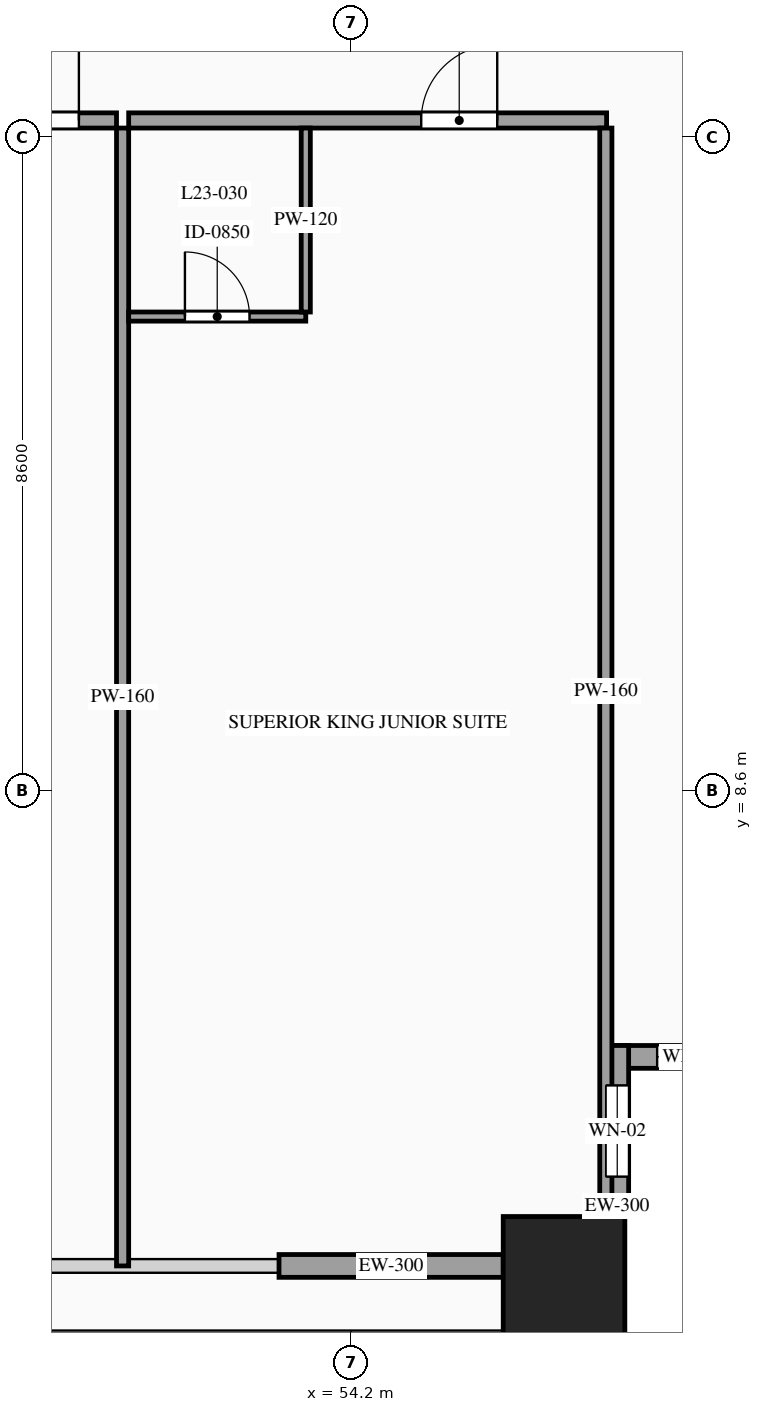
"""IFC4 building model, lengths in metres.
Left out: names, types, materials, properties, quantities, classifications, styles, units other than length and angle.
Written with IfcOpenShell. Run it as: python <this file> out.ifc"""

import sys

from ifc_helpers import new_model, si_unit, direction, frame, frame_2d, origin, origin_2d, place, context, subcontext, project, spatial, rectangle, hollow_rectangle, extrude, source, transform, mapped, element, fill, save


model = new_model("IFC4")
c1 = context("Model", 3, precision=1e-05, world=origin(), true_north=direction((0.0, 1.0)))
c2 = subcontext(c1, "Body", "Model", "MODEL_VIEW")
j1 = project(units=[si_unit("LENGTHUNIT", "METRE"), si_unit("PLANEANGLEUNIT", "RADIAN")], contexts=[c1])
p1 = place(None, origin())
s1 = spatial("IfcSite", under=j1, at=p1, CompositionType="ELEMENT")
p2 = place(p1, origin())
s2 = spatial("IfcBuilding", under=s1, at=p2, CompositionType="ELEMENT")
p3 = place(p2, frame((0.0, 0.0, 90.2)))
s3 = spatial("IfcBuildingStorey", under=s2, at=p3, CompositionType="ELEMENT", Elevation=90.2)
m1 = source(origin(), c2, "Body", "SweptSolid", [
    extrude(hollow_rectangle(XDim=1.6, YDim=1.6, WallThickness=0.07, at=origin_2d()), origin(), (0.0, 0.0, 1.0), 3.6),
])
p4 = place(p3, frame((57.0, 2.2, 0.0), z_axis=(0.0, 0.0, 1.0), x_axis=(1.0, 0.0, 0.0)))
e1 = element("IfcColumn", 1, at=p4, inside=s3, PredefinedType="COLUMN", context=c2, shape_type="MappedRepresentation", body=[
    mapped(m1, transform((0.0, 0.0, 0.0), scale=1.0)),
])
p5 = place(p3, frame((57.55, 5.1, 0.0), z_axis=(0.0, 0.0, 1.0), x_axis=(1.0, 0.0, 0.0)))
e2 = element("IfcWall", 2, at=p5, inside=s3, PredefinedType="SOLIDWALL", context=c2, shape_type="SweptSolid", body=[
    extrude(rectangle(XDim=2.25, YDim=0.3, at=frame_2d((1.125, 0.0))), origin(), (0.0, 0.0, 1.0), 3.38),
])
p6 = place(p5, frame((0.675, 0.0, 0.85)))
e3 = element("IfcOpeningElement", 3, at=p6, cuts=e2, PredefinedType="OPENING", context=c2, shape_type="SweptSolid", body=[
    extrude(rectangle(XDim=0.9, YDim=1.5, at=frame_2d((0.45, 0.75))), frame((0.0, 0.165, 0.0), z_axis=(0.0, -1.0, 0.0), x_axis=(1.0, 0.0, 0.0)), (0.0, 0.0, 1.0), 0.33),
])
p7 = place(p3, frame((57.7, 3.0, 0.0), z_axis=(0.0, 0.0, 1.0), x_axis=(0.0, 1.0, 0.0)))
e4 = element("IfcWall", 4, at=p7, inside=s3, PredefinedType="SOLIDWALL", context=c2, shape_type="SweptSolid", body=[
    extrude(rectangle(XDim=2.25, YDim=0.3, at=frame_2d((1.125, 0.0))), origin(), (0.0, 0.0, 1.0), 3.38),
])
p8 = place(p7, frame((0.525, 0.0, 0.85)))
e5 = element("IfcOpeningElement", 5, at=p8, cuts=e4, PredefinedType="OPENING", context=c2, shape_type="SweptSolid", body=[
    extrude(rectangle(XDim=1.2, YDim=2.1, at=frame_2d((0.6, 1.05))), frame((0.0, 0.165, 0.0), z_axis=(0.0, -1.0, 0.0), x_axis=(1.0, 0.0, 0.0)), (0.0, 0.0, 1.0), 0.33),
])
m2 = source(origin(), c2, "Body", "SweptSolid", [
    extrude(rectangle(XDim=2.95, YDim=0.3, at=frame_2d((1.475, 0.0))), origin(), (0.0, 0.0, 1.0), 2.775),
])
p9 = place(p3, frame((53.25, 2.35, 0.0), z_axis=(0.0, 0.0, 1.0), x_axis=(1.0, 0.0, 0.0)))
e6 = element("IfcWall", 6, at=p9, inside=s3, PredefinedType="SOLIDWALL", context=c2, shape_type="MappedRepresentation", body=[
    mapped(m2, transform((0.0, 0.0, 0.0), scale=1.0)),
])
p10 = place(p3, frame((46.714, 17.42, 0.0), z_axis=(0.0, 0.0, 1.0), x_axis=(1.0, 0.0, 0.0)))
e7 = element("IfcWall", 7, at=p10, inside=s3, PredefinedType="PARTITIONING", context=c2, shape_type="SweptSolid", body=[
    extrude(rectangle(XDim=4.398, YDim=0.2, at=frame_2d((2.199, 0.0))), origin(), (0.0, 0.0, 1.0), 3.38),
])
p11 = place(p10, frame((2.903, 0.0, 0.0)))
e8 = element("IfcOpeningElement", 8, at=p11, cuts=e7, PredefinedType="OPENING", context=c2, shape_type="SweptSolid", body=[
    extrude(rectangle(XDim=1.0, YDim=2.2, at=frame_2d((0.5, 1.1))), frame((0.0, 0.115, 0.0), z_axis=(0.0, -1.0, 0.0), x_axis=(1.0, 0.0, 0.0)), (0.0, 0.0, 1.0), 0.23),
])
m3 = source(origin(), c2, "Body", "SweptSolid", [
    extrude(rectangle(XDim=14.97, YDim=0.16, at=frame_2d((7.485, 0.0))), origin(), (0.0, 0.0, 1.0), 3.38),
])
p12 = place(p3, frame((51.192, 2.35, 0.0), z_axis=(0.0, 0.0, 1.0), x_axis=(0.0, 1.0, 0.0)))
e9 = element("IfcWall", 9, at=p12, inside=s3, PredefinedType="PARTITIONING", context=c2, shape_type="MappedRepresentation", body=[
    mapped(m3, transform((0.0, 0.0, 0.0), scale=1.0)),
])
p13 = place(p3, frame((51.272, 17.42, 0.0), z_axis=(0.0, 0.0, 1.0), x_axis=(1.0, 0.0, 0.0)))
e10 = element("IfcWall", 10, at=p13, inside=s3, PredefinedType="PARTITIONING", context=c2, shape_type="SweptSolid", body=[
    extrude(rectangle(XDim=6.288, YDim=0.2, at=frame_2d((3.144, 0.0))), origin(), (0.0, 0.0, 1.0), 3.38),
])
p14 = place(p13, frame((3.849, 0.0, 0.0)))
e11 = element("IfcOpeningElement", 11, at=p14, cuts=e10, PredefinedType="OPENING", context=c2, shape_type="SweptSolid", body=[
    extrude(rectangle(XDim=1.0, YDim=2.2, at=frame_2d((0.5, 1.1))), frame((0.0, 0.115, 0.0), z_axis=(0.0, -1.0, 0.0), x_axis=(1.0, 0.0, 0.0)), (0.0, 0.0, 1.0), 0.23),
])
m4 = source(origin(), c2, "Body", "SweptSolid", [
    extrude(rectangle(XDim=14.82, YDim=0.16, at=frame_2d((7.41, 0.0))), origin(), (0.0, 0.0, 1.0), 3.38),
])
p15 = place(p3, frame((57.55, 2.5, 0.0), z_axis=(0.0, 0.0, 1.0), x_axis=(0.0, 1.0, 0.0)))
e12 = element("IfcWall", 12, at=p15, inside=s3, PredefinedType="PARTITIONING", context=c2, shape_type="MappedRepresentation", body=[
    mapped(m4, transform((0.0, 0.0, 0.0), scale=1.0)),
])
p16 = place(p3, frame((51.272, 14.84, 0.0), z_axis=(0.0, 0.0, 1.0), x_axis=(1.0, 0.0, 0.0)))
e13 = element("IfcWall", 13, at=p16, inside=s3, PredefinedType="PARTITIONING", context=c2, shape_type="SweptSolid", body=[
    extrude(rectangle(XDim=2.33, YDim=0.12, at=frame_2d((1.165, 0.0))), origin(), (0.0, 0.0, 1.0), 3.38),
])
p17 = place(p16, frame((0.74, 0.0, 0.0)))
e14 = element("IfcOpeningElement", 14, at=p17, cuts=e13, PredefinedType="OPENING", context=c2, shape_type="SweptSolid", body=[
    extrude(rectangle(XDim=0.85, YDim=2.1, at=frame_2d((0.425, 1.05))), frame((0.0, 0.075, 0.0), z_axis=(0.0, -1.0, 0.0), x_axis=(1.0, 0.0, 0.0)), (0.0, 0.0, 1.0), 0.15),
])
m5 = source(origin(), c2, "Body", "SweptSolid", [
    extrude(rectangle(XDim=2.42, YDim=0.12, at=frame_2d((1.21, 0.0))), origin(), (0.0, 0.0, 1.0), 3.38),
])
p18 = place(p3, frame((53.602, 14.9, 0.0), z_axis=(0.0, 0.0, 1.0), x_axis=(0.0, 1.0, 0.0)))
e15 = element("IfcWall", 15, at=p18, inside=s3, PredefinedType="PARTITIONING", context=c2, shape_type="MappedRepresentation", body=[
    mapped(m5, transform((0.0, 0.0, 0.0), scale=1.0)),
])
m6 = source(origin(), c2, "Body", "SweptSolid", [
    extrude(rectangle(XDim=0.9, YDim=1.5, at=frame_2d((0.45, 0.75))), frame((0.0, 0.03, 0.0), z_axis=(0.0, -1.0, 0.0), x_axis=(1.0, 0.0, 0.0)), (0.0, 0.0, 1.0), 0.06),
])
p19 = place(p6, origin())
e16 = element("IfcWindow", 16, at=p19, inside=s3, PartitioningType="SINGLE_PANEL", PredefinedType="WINDOW", context=c2, shape_type="MappedRepresentation", body=[
    mapped(m6, transform((0.0, 0.0, 0.0), scale=1.0)),
])
fill(e3, e16)
m7 = source(origin(), c2, "Body", "SweptSolid", [
    extrude(rectangle(XDim=1.2, YDim=2.1, at=frame_2d((0.6, 1.05))), frame((0.0, 0.03, 0.0), z_axis=(0.0, -1.0, 0.0), x_axis=(1.0, 0.0, 0.0)), (0.0, 0.0, 1.0), 0.06),
])
p20 = place(p8, origin())
e17 = element("IfcWindow", 17, at=p20, inside=s3, PartitioningType="SINGLE_PANEL", PredefinedType="WINDOW", context=c2, shape_type="MappedRepresentation", body=[
    mapped(m7, transform((0.0, 0.0, 0.0), scale=1.0)),
])
fill(e5, e17)
m8 = source(origin(), c2, "Body", "SweptSolid", [
    extrude(rectangle(XDim=1.0, YDim=2.2, at=frame_2d((0.5, 1.1))), frame((0.0, 0.025, 0.0), z_axis=(0.0, -1.0, 0.0), x_axis=(1.0, 0.0, 0.0)), (0.0, 0.0, 1.0), 0.05),
])
p21 = place(p11, origin())
e18 = element("IfcDoor", 18, at=p21, inside=s3, OperationType="SINGLE_SWING_RIGHT", PredefinedType="DOOR", context=c2, shape_type="MappedRepresentation", body=[
    mapped(m8, transform((0.0, 0.0, 0.0), scale=1.0)),
])
fill(e8, e18)
p22 = place(p14, origin())
e19 = element("IfcDoor", 19, at=p22, inside=s3, OperationType="SINGLE_SWING_RIGHT", PredefinedType="DOOR", context=c2, shape_type="MappedRepresentation", body=[
    mapped(m8, transform((0.0, 0.0, 0.0), scale=1.0)),
])
fill(e11, e19)
m9 = source(origin(), c2, "Body", "SweptSolid", [
    extrude(rectangle(XDim=0.85, YDim=2.1, at=frame_2d((0.425, 1.05))), frame((0.0, 0.025, 0.0), z_axis=(0.0, -1.0, 0.0), x_axis=(1.0, 0.0, 0.0)), (0.0, 0.0, 1.0), 0.05),
])
p23 = place(p17, origin())
e20 = element("IfcDoor", 20, at=p23, inside=s3, OperationType="SINGLE_SWING_LEFT", PredefinedType="DOOR", context=c2, shape_type="MappedRepresentation", body=[
    mapped(m9, transform((0.0, 0.0, 0.0), scale=1.0)),
])
fill(e14, e20)
save(model, sys.argv[1])
